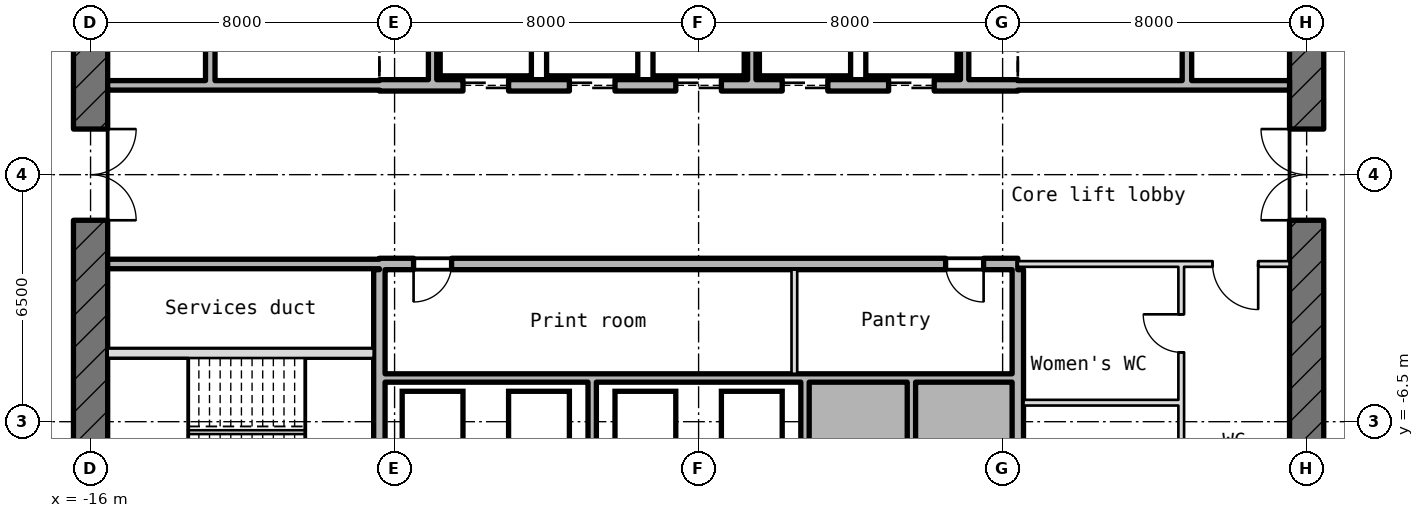
"""IFC4 building model, lengths in metres.
Left out: names, types, materials, properties, quantities, classifications, styles, units other than length and angle.
Written with IfcOpenShell. Run it as: python <this file> out.ifc"""

import sys

from ifc_helpers import new_model, si_unit, direction, frame, frame_2d, origin, place, context, subcontext, project, spatial, rectangle, extrude, element, fill, save


model = new_model("IFC4")
c1 = context("Model", 3, precision=1e-05, world=origin(), true_north=direction((0.0, 1.0)))
c2 = subcontext(c1, "Body", "Model", "MODEL_VIEW")
j1 = project(units=[si_unit("LENGTHUNIT", "METRE"), si_unit("PLANEANGLEUNIT", "RADIAN")], contexts=[c1])
p1 = place(None, origin())
s1 = spatial("IfcSite", under=j1, at=p1, CompositionType="ELEMENT")
p2 = place(p1, origin())
s2 = spatial("IfcBuilding", under=s1, at=p2, CompositionType="ELEMENT")
p3 = place(p2, frame((0.0, 0.0, 161.05)))
s3 = spatial("IfcBuildingStorey", under=s2, at=p3, CompositionType="ELEMENT", Elevation=161.05)
p4 = place(p3, frame((16.0, -10.186, -0.18), z_axis=(0.0, 0.0, 1.0), x_axis=(0.0, 1.0, 0.0)))
e1 = element("IfcWall", 1, at=p4, inside=s3, PredefinedType="SHEAR", context=c2, shape_type="SweptSolid", body=[
    extrude(rectangle(XDim=20.373, YDim=0.9, at=frame_2d((10.186, 0.0))), origin(), (0.0, 0.0, 1.0), 4.15),
])
p5 = place(p4, frame((8.986, 0.0, 0.18)))
e2 = element("IfcOpeningElement", 2, at=p5, cuts=e1, PredefinedType="OPENING", context=c2, shape_type="SweptSolid", body=[
    extrude(rectangle(XDim=2.4, YDim=2.1, at=frame_2d((1.2, 1.05))), frame((0.0, 0.46, 0.0), z_axis=(0.0, -1.0, 0.0), x_axis=(1.0, 0.0, 0.0)), (0.0, 0.0, 1.0), 0.92),
])
p6 = place(p4, frame((13.586, 0.0, 0.18)))
e3 = element("IfcOpeningElement", 3, at=p6, cuts=e1, PredefinedType="OPENING", context=c2, shape_type="SweptSolid", body=[
    extrude(rectangle(XDim=1.2, YDim=2.1, at=frame_2d((0.6, 1.05))), frame((0.0, 0.46, 0.0), z_axis=(0.0, -1.0, 0.0), x_axis=(1.0, 0.0, 0.0)), (0.0, 0.0, 1.0), 0.92),
])
p7 = place(p3, frame((-16.0, 10.186, -0.18), z_axis=(0.0, 0.0, 1.0), x_axis=(0.0, -1.0, 0.0)))
e4 = element("IfcWall", 4, at=p7, inside=s3, PredefinedType="SHEAR", context=c2, shape_type="SweptSolid", body=[
    extrude(rectangle(XDim=20.373, YDim=0.9, at=frame_2d((10.186, 0.0))), origin(), (0.0, 0.0, 1.0), 4.15),
])
p8 = place(p7, frame((8.986, 0.0, 0.18)))
e5 = element("IfcOpeningElement", 5, at=p8, cuts=e4, PredefinedType="OPENING", context=c2, shape_type="SweptSolid", body=[
    extrude(rectangle(XDim=2.4, YDim=2.1, at=frame_2d((1.2, 1.05))), frame((0.0, 0.46, 0.0), z_axis=(0.0, -1.0, 0.0), x_axis=(1.0, 0.0, 0.0)), (0.0, 0.0, 1.0), 0.92),
])
p9 = place(p7, frame((5.586, 0.0, 0.18)))
e6 = element("IfcOpeningElement", 6, at=p9, cuts=e4, PredefinedType="OPENING", context=c2, shape_type="SweptSolid", body=[
    extrude(rectangle(XDim=1.2, YDim=2.1, at=frame_2d((0.6, 1.05))), frame((0.0, 0.46, 0.0), z_axis=(0.0, -1.0, 0.0), x_axis=(1.0, 0.0, 0.0)), (0.0, 0.0, 1.0), 0.92),
])
p10 = place(p3, frame((8.55, -6.0, 0.0), z_axis=(0.0, 0.0, 1.0), x_axis=(1.0, 0.0, 0.0)))
e7 = element("IfcWall", 7, at=p10, inside=s3, PredefinedType="PARTITIONING", context=c2, shape_type="SweptSolid", body=[
    extrude(rectangle(XDim=4.075, YDim=0.15, at=frame_2d((2.038, 0.0))), origin(), (0.0, 0.0, 1.0), 3.97),
])
p11 = place(p3, frame((-8.25, -5.35, 0.0), z_axis=(0.0, 0.0, 1.0), x_axis=(1.0, 0.0, 0.0)))
e8 = element("IfcWall", 8, at=p11, inside=s3, PredefinedType="STANDARD", context=c2, shape_type="SweptSolid", body=[
    extrude(rectangle(XDim=16.5, YDim=0.22, at=frame_2d((8.25, 0.0))), origin(), (0.0, 0.0, 1.0), 3.97),
])
p12 = place(p3, frame((-15.55, -4.7, -0.18), z_axis=(0.0, 0.0, 1.0), x_axis=(1.0, 0.0, 0.0)))
e9 = element("IfcWall", 9, at=p12, inside=s3, PredefinedType="SHEAR", context=c2, shape_type="SweptSolid", body=[
    extrude(rectangle(XDim=7.0, YDim=0.25, at=frame_2d((3.5, 0.0))), origin(), (0.0, 0.0, 1.0), 4.15),
])
p13 = place(p3, frame((-15.55, -2.35, 0.0), z_axis=(0.0, 0.0, 1.0), x_axis=(1.0, 0.0, 0.0)))
e10 = element("IfcWall", 10, at=p13, inside=s3, PredefinedType="STANDARD", context=c2, shape_type="SweptSolid", body=[
    extrude(rectangle(XDim=7.15, YDim=0.25, at=frame_2d((3.575, 0.0))), origin(), (0.0, 0.0, 1.0), 3.97),
])
p14 = place(p3, frame((-8.4, -2.35, -0.18), z_axis=(0.0, 0.0, 1.0), x_axis=(1.0, 0.0, 0.0)))
e11 = element("IfcWall", 11, at=p14, inside=s3, PredefinedType="SHEAR", context=c2, shape_type="SweptSolid", body=[
    extrude(rectangle(XDim=16.8, YDim=0.3, at=frame_2d((8.4, 0.0))), origin(), (0.0, 0.0, 1.0), 4.15),
])
p15 = place(p14, frame((0.9, 0.0, 0.18)))
e12 = element("IfcOpeningElement", 12, at=p15, cuts=e11, PredefinedType="OPENING", context=c2, shape_type="SweptSolid", body=[
    extrude(rectangle(XDim=1.0, YDim=2.1, at=frame_2d((0.5, 1.05))), frame((0.0, 0.16, 0.0), z_axis=(0.0, -1.0, 0.0), x_axis=(1.0, 0.0, 0.0)), (0.0, 0.0, 1.0), 0.32),
])
p16 = place(p14, frame((14.9, 0.0, 0.18)))
e13 = element("IfcOpeningElement", 13, at=p16, cuts=e11, PredefinedType="OPENING", context=c2, shape_type="SweptSolid", body=[
    extrude(rectangle(XDim=1.0, YDim=2.1, at=frame_2d((0.5, 1.05))), frame((0.0, 0.16, 0.0), z_axis=(0.0, -1.0, 0.0), x_axis=(1.0, 0.0, 0.0)), (0.0, 0.0, 1.0), 0.32),
])
p17 = place(p3, frame((8.4, -2.35, 0.0), z_axis=(0.0, 0.0, 1.0), x_axis=(1.0, 0.0, 0.0)))
e14 = element("IfcWall", 14, at=p17, inside=s3, PredefinedType="PARTITIONING", context=c2, shape_type="SweptSolid", body=[
    extrude(rectangle(XDim=7.15, YDim=0.15, at=frame_2d((3.575, 0.0))), origin(), (0.0, 0.0, 1.0), 3.97),
])
p18 = place(p17, frame((5.125, 0.0, 0.0)))
e15 = element("IfcOpeningElement", 15, at=p18, cuts=e14, PredefinedType="OPENING", context=c2, shape_type="SweptSolid", body=[
    extrude(rectangle(XDim=1.2, YDim=2.1, at=frame_2d((0.6, 1.05))), frame((0.0, 0.085, 0.0), z_axis=(0.0, -1.0, 0.0), x_axis=(1.0, 0.0, 0.0)), (0.0, 0.0, 1.0), 0.17),
])
p19 = place(p3, frame((-15.55, 2.35, 0.0), z_axis=(0.0, 0.0, 1.0), x_axis=(1.0, 0.0, 0.0)))
e16 = element("IfcWall", 16, at=p19, inside=s3, PredefinedType="STANDARD", context=c2, shape_type="SweptSolid", body=[
    extrude(rectangle(XDim=7.15, YDim=0.25, at=frame_2d((3.575, 0.0))), origin(), (0.0, 0.0, 1.0), 3.97),
])
p20 = place(p3, frame((-8.4, 2.35, -0.18), z_axis=(0.0, 0.0, 1.0), x_axis=(1.0, 0.0, 0.0)))
e17 = element("IfcWall", 17, at=p20, inside=s3, PredefinedType="SHEAR", context=c2, shape_type="SweptSolid", body=[
    extrude(rectangle(XDim=16.8, YDim=0.3, at=frame_2d((8.4, 0.0))), origin(), (0.0, 0.0, 1.0), 4.15),
])
p21 = place(p20, frame((2.2, 0.0, 0.18)))
e18 = element("IfcOpeningElement", 18, at=p21, cuts=e17, PredefinedType="OPENING", context=c2, shape_type="SweptSolid", body=[
    extrude(rectangle(XDim=1.2, YDim=2.1, at=frame_2d((0.6, 1.05))), frame((0.0, 0.16, 0.0), z_axis=(0.0, -1.0, 0.0), x_axis=(1.0, 0.0, 0.0)), (0.0, 0.0, 1.0), 0.32),
])
p22 = place(p20, frame((5.0, 0.0, 0.18)))
e19 = element("IfcOpeningElement", 19, at=p22, cuts=e17, PredefinedType="OPENING", context=c2, shape_type="SweptSolid", body=[
    extrude(rectangle(XDim=1.2, YDim=2.1, at=frame_2d((0.6, 1.05))), frame((0.0, 0.16, 0.0), z_axis=(0.0, -1.0, 0.0), x_axis=(1.0, 0.0, 0.0)), (0.0, 0.0, 1.0), 0.32),
])
p23 = place(p20, frame((7.8, 0.0, 0.18)))
e20 = element("IfcOpeningElement", 20, at=p23, cuts=e17, PredefinedType="OPENING", context=c2, shape_type="SweptSolid", body=[
    extrude(rectangle(XDim=1.2, YDim=2.1, at=frame_2d((0.6, 1.05))), frame((0.0, 0.16, 0.0), z_axis=(0.0, -1.0, 0.0), x_axis=(1.0, 0.0, 0.0)), (0.0, 0.0, 1.0), 0.32),
])
p24 = place(p20, frame((10.6, 0.0, 0.18)))
e21 = element("IfcOpeningElement", 21, at=p24, cuts=e17, PredefinedType="OPENING", context=c2, shape_type="SweptSolid", body=[
    extrude(rectangle(XDim=1.2, YDim=2.1, at=frame_2d((0.6, 1.05))), frame((0.0, 0.16, 0.0), z_axis=(0.0, -1.0, 0.0), x_axis=(1.0, 0.0, 0.0)), (0.0, 0.0, 1.0), 0.32),
])
p25 = place(p20, frame((13.4, 0.0, 0.18)))
e22 = element("IfcOpeningElement", 22, at=p25, cuts=e17, PredefinedType="OPENING", context=c2, shape_type="SweptSolid", body=[
    extrude(rectangle(XDim=1.2, YDim=2.1, at=frame_2d((0.6, 1.05))), frame((0.0, 0.16, 0.0), z_axis=(0.0, -1.0, 0.0), x_axis=(1.0, 0.0, 0.0)), (0.0, 0.0, 1.0), 0.32),
])
p26 = place(p3, frame((8.4, 2.35, 0.0), z_axis=(0.0, 0.0, 1.0), x_axis=(1.0, 0.0, 0.0)))
e23 = element("IfcWall", 23, at=p26, inside=s3, PredefinedType="STANDARD", context=c2, shape_type="SweptSolid", body=[
    extrude(rectangle(XDim=7.15, YDim=0.25, at=frame_2d((3.575, 0.0))), origin(), (0.0, 0.0, 1.0), 3.97),
])
p27 = place(p3, frame((-12.85, 2.475, 0.0), z_axis=(0.0, 0.0, 1.0), x_axis=(0.0, 1.0, 0.0)))
e24 = element("IfcWall", 24, at=p27, inside=s3, PredefinedType="STANDARD", context=c2, shape_type="SweptSolid", body=[
    extrude(rectangle(XDim=3.05, YDim=0.25, at=frame_2d((1.525, 0.0))), origin(), (0.0, 0.0, 1.0), 3.97),
])
p28 = place(p3, frame((-8.4, -8.75, -0.18), z_axis=(0.0, 0.0, 1.0), x_axis=(0.0, 1.0, 0.0)))
e25 = element("IfcWall", 25, at=p28, inside=s3, PredefinedType="SHEAR", context=c2, shape_type="SweptSolid", body=[
    extrude(rectangle(XDim=6.25, YDim=0.3, at=frame_2d((3.125, 0.0))), origin(), (0.0, 0.0, 1.0), 4.15),
])
p29 = place(p3, frame((-7.0, 2.5, 0.0), z_axis=(0.0, 0.0, 1.0), x_axis=(0.0, 1.0, 0.0)))
e26 = element("IfcWall", 26, at=p29, inside=s3, PredefinedType="STANDARD", context=c2, shape_type="SweptSolid", body=[
    extrude(rectangle(XDim=2.74, YDim=0.22, at=frame_2d((1.37, 0.0))), origin(), (0.0, 0.0, 1.0), 3.97),
])
p30 = place(p3, frame((-2.8, -8.35, 0.0), z_axis=(0.0, 0.0, 1.0), x_axis=(0.0, 1.0, 0.0)))
e27 = element("IfcWall", 27, at=p30, inside=s3, PredefinedType="STANDARD", context=c2, shape_type="SweptSolid", body=[
    extrude(rectangle(XDim=2.89, YDim=0.22, at=frame_2d((1.445, 0.0))), origin(), (0.0, 0.0, 1.0), 3.97),
])
p31 = place(p3, frame((1.4, 2.5, 0.0), z_axis=(0.0, 0.0, 1.0), x_axis=(0.0, 1.0, 0.0)))
e28 = element("IfcWall", 28, at=p31, inside=s3, PredefinedType="STANDARD", context=c2, shape_type="SweptSolid", body=[
    extrude(rectangle(XDim=2.74, YDim=0.22, at=frame_2d((1.37, 0.0))), origin(), (0.0, 0.0, 1.0), 3.97),
])
p32 = place(p3, frame((2.52, -5.24, 0.0), z_axis=(0.0, 0.0, 1.0), x_axis=(0.0, 1.0, 0.0)))
e29 = element("IfcWall", 29, at=p32, inside=s3, PredefinedType="PARTITIONING", context=c2, shape_type="SweptSolid", body=[
    extrude(rectangle(XDim=2.74, YDim=0.15, at=frame_2d((1.37, 0.0))), origin(), (0.0, 0.0, 1.0), 3.97),
])
for number, where, z_axis, x_axis in (
    (30, (2.8, -8.24, 0.0), (0.0, 0.0, 1.0), (0.0, 1.0, 0.0)),
    (31, (5.6, -8.24, 0.0), (0.0, 0.0, 1.0), (0.0, 1.0, 0.0)),
):
    element("IfcWall", number, at=place(p3, frame(where, z_axis=z_axis, x_axis=x_axis)), inside=s3, PredefinedType="STANDARD", context=c2, shape_type="SweptSolid", body=[
        extrude(rectangle(XDim=2.78, YDim=0.22, at=frame_2d((1.39, 0.0))), origin(), (0.0, 0.0, 1.0), 3.97),
    ])
p33 = place(p3, frame((7.0, 2.5, 0.0), z_axis=(0.0, 0.0, 1.0), x_axis=(0.0, 1.0, 0.0)))
e32 = element("IfcWall", 32, at=p33, inside=s3, PredefinedType="STANDARD", context=c2, shape_type="SweptSolid", body=[
    extrude(rectangle(XDim=2.74, YDim=0.22, at=frame_2d((1.37, 0.0))), origin(), (0.0, 0.0, 1.0), 3.97),
])
p34 = place(p3, frame((8.4, -8.35, -0.18), z_axis=(0.0, 0.0, 1.0), x_axis=(0.0, 1.0, 0.0)))
e33 = element("IfcWall", 33, at=p34, inside=s3, PredefinedType="SHEAR", context=c2, shape_type="SweptSolid", body=[
    extrude(rectangle(XDim=5.85, YDim=0.3, at=frame_2d((2.925, 0.0))), origin(), (0.0, 0.0, 1.0), 4.15),
])
p35 = place(p3, frame((12.7, -12.55, 0.0), z_axis=(0.0, 0.0, 1.0), x_axis=(0.0, 1.0, 0.0)))
e34 = element("IfcWall", 34, at=p35, inside=s3, PredefinedType="PARTITIONING", context=c2, shape_type="SweptSolid", body=[
    extrude(rectangle(XDim=10.125, YDim=0.15, at=frame_2d((5.062, 0.0))), origin(), (0.0, 0.0, 1.0), 3.97),
])
p36 = place(p35, frame((7.875, 0.0, 0.0)))
e35 = element("IfcOpeningElement", 35, at=p36, cuts=e34, PredefinedType="OPENING", context=c2, shape_type="SweptSolid", body=[
    extrude(rectangle(XDim=1.0, YDim=2.1, at=frame_2d((0.5, 1.05))), frame((0.0, 0.085, 0.0), z_axis=(0.0, -1.0, 0.0), x_axis=(1.0, 0.0, 0.0)), (0.0, 0.0, 1.0), 0.17),
])
p37 = place(p35, frame((2.775, 0.0, 0.0)))
e36 = element("IfcOpeningElement", 36, at=p37, cuts=e34, PredefinedType="OPENING", context=c2, shape_type="SweptSolid", body=[
    extrude(rectangle(XDim=1.0, YDim=2.1, at=frame_2d((0.5, 1.05))), frame((0.0, 0.085, 0.0), z_axis=(0.0, -1.0, 0.0), x_axis=(1.0, 0.0, 0.0)), (0.0, 0.0, 1.0), 0.17),
])
p38 = place(p3, frame((12.85, 2.475, 0.0), z_axis=(0.0, 0.0, 1.0), x_axis=(0.0, 1.0, 0.0)))
e37 = element("IfcWall", 37, at=p38, inside=s3, PredefinedType="STANDARD", context=c2, shape_type="SweptSolid", body=[
    extrude(rectangle(XDim=3.05, YDim=0.25, at=frame_2d((1.525, 0.0))), origin(), (0.0, 0.0, 1.0), 3.97),
])
p39 = place(p21, origin())
e38 = element("IfcDoor", 38, at=p39, inside=s3, OperationType="DOUBLE_DOOR_SLIDING", PredefinedType="DOOR", context=c2, shape_type="SweptSolid", body=[
    extrude(rectangle(XDim=1.2, YDim=2.1, at=frame_2d((0.6, 1.05))), frame((0.0, 0.025, 0.0), z_axis=(0.0, -1.0, 0.0), x_axis=(1.0, 0.0, 0.0)), (0.0, 0.0, 1.0), 0.05),
])
fill(e18, e38)
p40 = place(p22, origin())
e39 = element("IfcDoor", 39, at=p40, inside=s3, OperationType="DOUBLE_DOOR_SLIDING", PredefinedType="DOOR", context=c2, shape_type="SweptSolid", body=[
    extrude(rectangle(XDim=1.2, YDim=2.1, at=frame_2d((0.6, 1.05))), frame((0.0, 0.025, 0.0), z_axis=(0.0, -1.0, 0.0), x_axis=(1.0, 0.0, 0.0)), (0.0, 0.0, 1.0), 0.05),
])
fill(e19, e39)
p41 = place(p23, origin())
e40 = element("IfcDoor", 40, at=p41, inside=s3, OperationType="DOUBLE_DOOR_SLIDING", PredefinedType="DOOR", context=c2, shape_type="SweptSolid", body=[
    extrude(rectangle(XDim=1.2, YDim=2.1, at=frame_2d((0.6, 1.05))), frame((0.0, 0.025, 0.0), z_axis=(0.0, -1.0, 0.0), x_axis=(1.0, 0.0, 0.0)), (0.0, 0.0, 1.0), 0.05),
])
fill(e20, e40)
p42 = place(p24, origin())
e41 = element("IfcDoor", 41, at=p42, inside=s3, OperationType="DOUBLE_DOOR_SLIDING", PredefinedType="DOOR", context=c2, shape_type="SweptSolid", body=[
    extrude(rectangle(XDim=1.2, YDim=2.1, at=frame_2d((0.6, 1.05))), frame((0.0, 0.025, 0.0), z_axis=(0.0, -1.0, 0.0), x_axis=(1.0, 0.0, 0.0)), (0.0, 0.0, 1.0), 0.05),
])
fill(e21, e41)
p43 = place(p25, origin())
e42 = element("IfcDoor", 42, at=p43, inside=s3, OperationType="DOUBLE_DOOR_SLIDING", PredefinedType="DOOR", context=c2, shape_type="SweptSolid", body=[
    extrude(rectangle(XDim=1.2, YDim=2.1, at=frame_2d((0.6, 1.05))), frame((0.0, 0.025, 0.0), z_axis=(0.0, -1.0, 0.0), x_axis=(1.0, 0.0, 0.0)), (0.0, 0.0, 1.0), 0.05),
])
fill(e22, e42)
p44 = place(p8, origin())
e43 = element("IfcDoor", 43, at=p44, inside=s3, OperationType="DOUBLE_DOOR_SINGLE_SWING", PredefinedType="DOOR", context=c2, shape_type="SweptSolid", body=[
    extrude(rectangle(XDim=2.4, YDim=2.1, at=frame_2d((1.2, 1.05))), frame((0.0, 0.025, 0.0), z_axis=(0.0, -1.0, 0.0), x_axis=(1.0, 0.0, 0.0)), (0.0, 0.0, 1.0), 0.05),
])
fill(e5, e43)
p45 = place(p5, origin())
e44 = element("IfcDoor", 44, at=p45, inside=s3, OperationType="DOUBLE_DOOR_SINGLE_SWING", PredefinedType="DOOR", context=c2, shape_type="SweptSolid", body=[
    extrude(rectangle(XDim=2.4, YDim=2.1, at=frame_2d((1.2, 1.05))), frame((0.0, 0.025, 0.0), z_axis=(0.0, -1.0, 0.0), x_axis=(1.0, 0.0, 0.0)), (0.0, 0.0, 1.0), 0.05),
])
fill(e2, e44)
p46 = place(p15, frame((1.0, 0.0, 0.0), z_axis=(0.0, 0.0, 1.0), x_axis=(-1.0, 0.0, 0.0)))
e45 = element("IfcDoor", 45, at=p46, inside=s3, OperationType="SINGLE_SWING_LEFT", PredefinedType="DOOR", context=c2, shape_type="SweptSolid", body=[
    extrude(rectangle(XDim=1.0, YDim=2.1, at=frame_2d((0.5, 1.05))), frame((0.0, 0.025, 0.0), z_axis=(0.0, -1.0, 0.0), x_axis=(1.0, 0.0, 0.0)), (0.0, 0.0, 1.0), 0.05),
])
fill(e12, e45)
p47 = place(p16, frame((1.0, 0.0, 0.0), z_axis=(0.0, 0.0, 1.0), x_axis=(-1.0, 0.0, 0.0)))
e46 = element("IfcDoor", 46, at=p47, inside=s3, OperationType="SINGLE_SWING_LEFT", PredefinedType="DOOR", context=c2, shape_type="SweptSolid", body=[
    extrude(rectangle(XDim=1.0, YDim=2.1, at=frame_2d((0.5, 1.05))), frame((0.0, 0.025, 0.0), z_axis=(0.0, -1.0, 0.0), x_axis=(1.0, 0.0, 0.0)), (0.0, 0.0, 1.0), 0.05),
])
fill(e13, e46)
p48 = place(p18, frame((1.2, 0.0, 0.0), z_axis=(0.0, 0.0, 1.0), x_axis=(-1.0, 0.0, 0.0)))
e47 = element("IfcDoor", 47, at=p48, inside=s3, OperationType="SINGLE_SWING_LEFT", PredefinedType="DOOR", context=c2, shape_type="SweptSolid", body=[
    extrude(rectangle(XDim=1.2, YDim=2.1, at=frame_2d((0.6, 1.05))), frame((0.0, 0.025, 0.0), z_axis=(0.0, -1.0, 0.0), x_axis=(1.0, 0.0, 0.0)), (0.0, 0.0, 1.0), 0.05),
])
fill(e15, e47)
p49 = place(p36, origin())
e48 = element("IfcDoor", 48, at=p49, inside=s3, OperationType="SINGLE_SWING_RIGHT", PredefinedType="DOOR", context=c2, shape_type="SweptSolid", body=[
    extrude(rectangle(XDim=1.0, YDim=2.1, at=frame_2d((0.5, 1.05))), frame((0.0, 0.025, 0.0), z_axis=(0.0, -1.0, 0.0), x_axis=(1.0, 0.0, 0.0)), (0.0, 0.0, 1.0), 0.05),
])
fill(e35, e48)
save(model, sys.argv[1])
